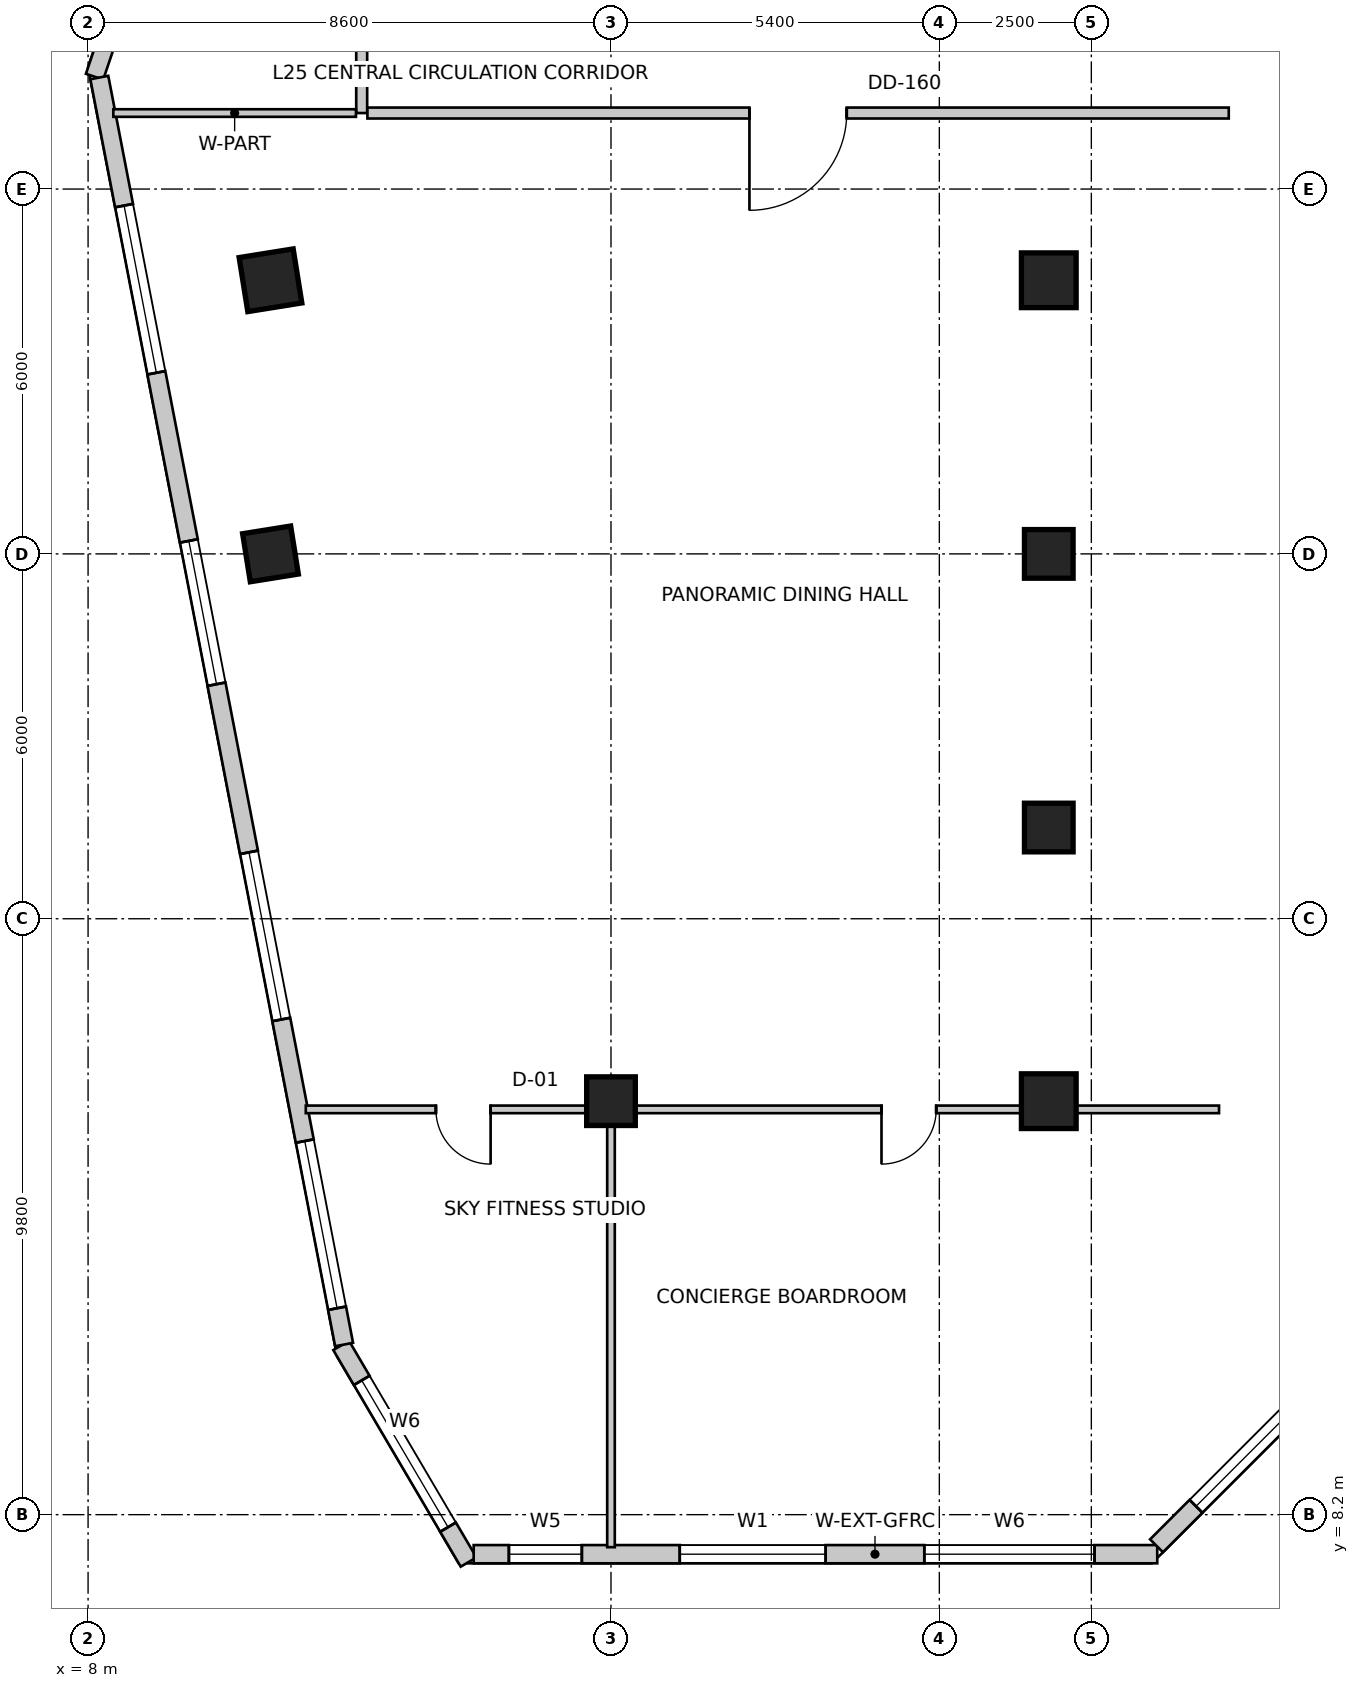
"""IFC4 building model, lengths in metres.
Left out: names, types, materials, properties, quantities, classifications, styles, units other than length and angle.
Written with IfcOpenShell. Run it as: python <this file> out.ifc"""

import sys

from ifc_helpers import new_model, si_unit, direction, frame, frame_2d, origin, origin_2d, place, context, subcontext, project, spatial, rectangle, extrude, source, transform, mapped, element, fill, save


model = new_model("IFC4")
c1 = context("Model", 3, precision=1e-05, world=origin(), true_north=direction((0.0, 1.0)))
c2 = subcontext(c1, "Body", "Model", "MODEL_VIEW")
j1 = project(units=[si_unit("LENGTHUNIT", "METRE"), si_unit("PLANEANGLEUNIT", "RADIAN")], contexts=[c1])
p1 = place(None, origin())
s1 = spatial("IfcSite", under=j1, at=p1, CompositionType="ELEMENT")
p2 = place(p1, origin())
s2 = spatial("IfcBuilding", under=s1, at=p2, CompositionType="ELEMENT")
p3 = place(p2, frame((0.0, 0.0, 105.4)))
s3 = spatial("IfcBuildingStorey", under=s2, at=p3, CompositionType="ELEMENT", Elevation=105.4)
m1 = source(origin(), c2, "Body", "SweptSolid", [
    extrude(rectangle(XDim=0.9, YDim=0.9, at=origin_2d()), origin(), (0.0, 0.0, 1.0), 5.2),
])
p4 = place(p3, frame((11.0, 28.5, 0.0), z_axis=(0.0, 0.0, 1.0), x_axis=(0.158158067254, -0.987413806751, 0.0)))
e1 = element("IfcColumn", 1, at=p4, inside=s3, PredefinedType="COLUMN", context=c2, shape_type="MappedRepresentation", body=[
    mapped(m1, transform((0.0, 0.0, 0.0), scale=1.0)),
])
m2 = source(origin(), c2, "Body", "SweptSolid", [
    extrude(rectangle(XDim=0.8, YDim=0.8, at=origin_2d()), origin(), (0.0, 0.0, 1.0), 5.2),
])
p5 = place(p3, frame((11.0, 24.0, 0.0), z_axis=(0.0, 0.0, 1.0), x_axis=(0.158158067254, -0.987413806751, 0.0)))
e2 = element("IfcColumn", 2, at=p5, inside=s3, PredefinedType="COLUMN", context=c2, shape_type="MappedRepresentation", body=[
    mapped(m2, transform((0.0, 0.0, 0.0), scale=1.0)),
])
p6 = place(p3, frame((23.8, 28.5, 0.0), z_axis=(0.0, 0.0, 1.0), x_axis=(1.0, 0.0, 0.0)))
e3 = element("IfcColumn", 3, at=p6, inside=s3, PredefinedType="COLUMN", context=c2, shape_type="MappedRepresentation", body=[
    mapped(m1, transform((0.0, 0.0, 0.0), scale=1.0)),
])
for number, where, z_axis, x_axis in (
    (4, (23.8, 24.0, 0.0), (0.0, 0.0, 1.0), (1.0, 0.0, 0.0)),
    (5, (23.8, 19.5, 0.0), (0.0, 0.0, 1.0), (1.0, 0.0, 0.0)),
):
    element("IfcColumn", number, at=place(p3, frame(where, z_axis=z_axis, x_axis=x_axis)), inside=s3, PredefinedType="COLUMN", context=c2, shape_type="MappedRepresentation", body=[
        mapped(m2, transform((0.0, 0.0, 0.0), scale=1.0)),
    ])
p7 = place(p3, frame((23.8, 15.0, 0.0), z_axis=(0.0, 0.0, 1.0), x_axis=(1.0, 0.0, 0.0)))
e6 = element("IfcColumn", 6, at=p7, inside=s3, PredefinedType="COLUMN", context=c2, shape_type="MappedRepresentation", body=[
    mapped(m1, transform((0.0, 0.0, 0.0), scale=1.0)),
])
p8 = place(p3, frame((16.6, 15.0, 0.0), z_axis=(0.0, 0.0, 1.0), x_axis=(1.0, 0.0, 0.0)))
e7 = element("IfcColumn", 7, at=p8, inside=s3, PredefinedType="COLUMN", context=c2, shape_type="MappedRepresentation", body=[
    mapped(m2, transform((0.0, 0.0, 0.0), scale=1.0)),
])
p9 = place(p3, frame((12.162, 10.983, 0.0), z_axis=(0.0, 0.0, 1.0), x_axis=(0.506996893234, -0.861947881401, 0.0)))
e8 = element("IfcWall", 8, at=p9, inside=s3, PredefinedType="SOLIDWALL", context=c2, shape_type="SweptSolid", body=[
    extrude(rectangle(XDim=4.133, YDim=0.3, at=frame_2d((2.066, 0.0))), origin(), (0.0, 0.0, 1.0), 4.95),
])
m3 = source(origin(), c2, "Body", "SweptSolid", [
    extrude(rectangle(XDim=2.8, YDim=2.4, at=frame_2d((1.4, 1.2))), frame((0.0, 0.16, 0.0), z_axis=(0.0, -1.0, 0.0), x_axis=(1.0, 0.0, 0.0)), (0.0, 0.0, 1.0), 0.32),
])
p10 = place(p9, frame((0.667, 0.0, 0.85)))
e9 = element("IfcOpeningElement", 9, at=p10, cuts=e8, PredefinedType="OPENING", context=c2, shape_type="MappedRepresentation", body=[
    mapped(m3, transform((0.0, 0.0, 0.0), scale=1.0)),
])
p11 = place(p3, frame((14.342, 7.55, 0.0), z_axis=(0.0, 0.0, 1.0), x_axis=(1.0, 0.0, 0.0)))
e10 = element("IfcWall", 10, at=p11, inside=s3, PredefinedType="SOLIDWALL", context=c2, shape_type="SweptSolid", body=[
    extrude(rectangle(XDim=11.242, YDim=0.3, at=frame_2d((5.621, 0.0))), origin(), (0.0, 0.0, 1.0), 4.95),
])
m4 = source(origin(), c2, "Body", "SweptSolid", [
    extrude(rectangle(XDim=1.2, YDim=1.6, at=frame_2d((0.6, 0.8))), frame((0.0, 0.16, 0.0), z_axis=(0.0, -1.0, 0.0), x_axis=(1.0, 0.0, 0.0)), (0.0, 0.0, 1.0), 0.32),
])
p12 = place(p11, frame((0.579, 0.0, 0.85)))
e11 = element("IfcOpeningElement", 11, at=p12, cuts=e10, PredefinedType="OPENING", context=c2, shape_type="MappedRepresentation", body=[
    mapped(m4, transform((0.0, 0.0, 0.0), scale=1.0)),
])
m5 = source(origin(), c2, "Body", "SweptSolid", [
    extrude(rectangle(XDim=2.4, YDim=2.2, at=frame_2d((1.2, 1.1))), frame((0.0, 0.16, 0.0), z_axis=(0.0, -1.0, 0.0), x_axis=(1.0, 0.0, 0.0)), (0.0, 0.0, 1.0), 0.32),
])
p13 = place(p11, frame((3.389, 0.0, 0.85)))
e12 = element("IfcOpeningElement", 12, at=p13, cuts=e10, PredefinedType="OPENING", context=c2, shape_type="MappedRepresentation", body=[
    mapped(m5, transform((0.0, 0.0, 0.0), scale=1.0)),
])
p14 = place(p11, frame((7.411, 0.0, 0.85)))
e13 = element("IfcOpeningElement", 13, at=p14, cuts=e10, PredefinedType="OPENING", context=c2, shape_type="MappedRepresentation", body=[
    mapped(m3, transform((0.0, 0.0, 0.0), scale=1.0)),
])
p15 = place(p3, frame((25.572, 7.688, 0.0), z_axis=(0.0, 0.0, 1.0), x_axis=(0.70708046583, 0.707133095564, 0.0)))
e14 = element("IfcWall", 14, at=p15, inside=s3, PredefinedType="SOLIDWALL", context=c2, shape_type="SweptSolid", body=[
    extrude(rectangle(XDim=4.639, YDim=0.3, at=frame_2d((2.319, 0.0))), origin(), (0.0, 0.0, 1.0), 4.95),
])
p16 = place(p15, frame((0.919, 0.0, 0.85)))
e15 = element("IfcOpeningElement", 15, at=p16, cuts=e14, PredefinedType="OPENING", context=c2, shape_type="MappedRepresentation", body=[
    mapped(m3, transform((0.0, 0.0, 0.0), scale=1.0)),
])
p17 = place(p3, frame((13.269, 47.134, 0.0), z_axis=(0.0, 0.0, 1.0), x_axis=(-0.319929596295, -0.947441319246, 0.0)))
e16 = element("IfcWall", 16, at=p17, inside=s3, PredefinedType="SOLIDWALL", context=c2, shape_type="SweptSolid", body=[
    extrude(rectangle(XDim=16.134, YDim=0.3, at=frame_2d((8.067, 0.0))), origin(), (0.0, 0.0, 1.0), 4.95),
])
p18 = place(p17, frame((2.276, 0.0, 0.85)))
e17 = element("IfcOpeningElement", 17, at=p18, cuts=e16, PredefinedType="OPENING", context=c2, shape_type="MappedRepresentation", body=[
    mapped(m5, transform((0.0, 0.0, 0.0), scale=1.0)),
])
p19 = place(p17, frame((7.011, 0.0, 0.85)))
e18 = element("IfcOpeningElement", 18, at=p19, cuts=e16, PredefinedType="OPENING", context=c2, shape_type="MappedRepresentation", body=[
    mapped(m3, transform((0.0, 0.0, 0.0), scale=1.0)),
])
p20 = place(p17, frame((12.147, 0.0, 0.85)))
e19 = element("IfcOpeningElement", 19, at=p20, cuts=e16, PredefinedType="OPENING", context=c2, shape_type="MappedRepresentation", body=[
    mapped(m5, transform((0.0, 0.0, 0.0), scale=1.0)),
])
p21 = place(p3, frame((8.185, 31.834, 0.0), z_axis=(0.0, 0.0, 1.0), x_axis=(0.189707113148, -0.981840725994, 0.0)))
e20 = element("IfcWall", 20, at=p21, inside=s3, PredefinedType="SOLIDWALL", context=c2, shape_type="SweptSolid", body=[
    extrude(rectangle(XDim=21.221, YDim=0.3, at=frame_2d((10.611, 0.0))), origin(), (0.0, 0.0, 1.0), 4.95),
])
p22 = place(p21, frame((2.145, 0.0, 0.85)))
e21 = element("IfcOpeningElement", 21, at=p22, cuts=e20, PredefinedType="OPENING", context=c2, shape_type="MappedRepresentation", body=[
    mapped(m3, transform((0.0, 0.0, 0.0), scale=1.0)),
])
p23 = place(p21, frame((7.761, 0.0, 0.85)))
e22 = element("IfcOpeningElement", 22, at=p23, cuts=e20, PredefinedType="OPENING", context=c2, shape_type="MappedRepresentation", body=[
    mapped(m5, transform((0.0, 0.0, 0.0), scale=1.0)),
])
p24 = place(p21, frame((12.977, 0.0, 0.85)))
e23 = element("IfcOpeningElement", 23, at=p24, cuts=e20, PredefinedType="OPENING", context=c2, shape_type="MappedRepresentation", body=[
    mapped(m3, transform((0.0, 0.0, 0.0), scale=1.0)),
])
p25 = place(p21, frame((17.813, 0.0, 0.85)))
e24 = element("IfcOpeningElement", 24, at=p25, cuts=e20, PredefinedType="OPENING", context=c2, shape_type="MappedRepresentation", body=[
    mapped(m3, transform((0.0, 0.0, 0.0), scale=1.0)),
])
p26 = place(p3, frame((12.5, 31.25, 0.0), z_axis=(0.0, 0.0, 1.0), x_axis=(0.0, 1.0, 0.0)))
e25 = element("IfcWall", 25, at=p26, inside=s3, PredefinedType="PARTITIONING", context=c2, shape_type="SweptSolid", body=[
    extrude(rectangle(XDim=2.2, YDim=0.18, at=frame_2d((1.1, 0.0))), origin(), (0.0, 0.0, 1.0), 4.619),
])
p27 = place(p3, frame((26.76, 31.25, 0.0), z_axis=(0.0, 0.0, 1.0), x_axis=(-1.0, 0.0, 0.0)))
e26 = element("IfcWall", 26, at=p27, inside=s3, PredefinedType="PARTITIONING", context=c2, shape_type="SweptSolid", body=[
    extrude(rectangle(XDim=14.166, YDim=0.18, at=frame_2d((7.083, 0.0))), origin(), (0.0, 0.0, 1.0), 4.619),
])
m6 = source(origin(), c2, "Body", "SweptSolid", [
    extrude(rectangle(XDim=1.6, YDim=2.15, at=frame_2d((0.8, 1.075))), frame((0.0, 0.1, 0.0), z_axis=(0.0, -1.0, 0.0), x_axis=(1.0, 0.0, 0.0)), (0.0, 0.0, 1.0), 0.2),
])
p28 = place(p27, frame((6.283, 0.0, 0.0)))
e27 = element("IfcOpeningElement", 27, at=p28, cuts=e26, PredefinedType="OPENING", context=c2, shape_type="MappedRepresentation", body=[
    mapped(m6, transform((0.0, 0.0, 0.0), scale=1.0)),
])
p29 = place(p3, frame((12.406, 31.25, 0.0), z_axis=(0.0, 0.0, 1.0), x_axis=(-1.0, 0.0, 0.0)))
e28 = element("IfcWall", 28, at=p29, inside=s3, PredefinedType="PARTITIONING", context=c2, shape_type="SweptSolid", body=[
    extrude(rectangle(XDim=3.991, YDim=0.125, at=frame_2d((1.996, 0.0))), origin(), (0.0, 0.0, 1.0), 4.092),
])
p30 = place(p3, frame((16.76, 14.865, 0.0), z_axis=(0.0, 0.0, 1.0), x_axis=(-1.0, 0.0, 0.0)))
e29 = element("IfcWall", 29, at=p30, inside=s3, PredefinedType="PARTITIONING", context=c2, shape_type="SweptSolid", body=[
    extrude(rectangle(XDim=5.179, YDim=0.125, at=frame_2d((2.59, 0.0))), origin(), (0.0, 0.0, 1.0), 4.092),
])
m7 = source(origin(), c2, "Body", "SweptSolid", [
    extrude(rectangle(XDim=0.9, YDim=2.15, at=frame_2d((0.45, 1.075))), frame((0.0, 0.073, 0.0), z_axis=(0.0, -1.0, 0.0), x_axis=(1.0, 0.0, 0.0)), (0.0, 0.0, 1.0), 0.145),
])
p31 = place(p30, frame((2.14, 0.0, 0.0)))
e30 = element("IfcOpeningElement", 30, at=p31, cuts=e29, PredefinedType="OPENING", context=c2, shape_type="MappedRepresentation", body=[
    mapped(m7, transform((0.0, 0.0, 0.0), scale=1.0)),
])
p32 = place(p3, frame((26.6, 14.865, 0.0), z_axis=(0.0, 0.0, 1.0), x_axis=(-1.0, 0.0, 0.0)))
e31 = element("IfcWall", 31, at=p32, inside=s3, PredefinedType="PARTITIONING", context=c2, shape_type="SweptSolid", body=[
    extrude(rectangle(XDim=9.838, YDim=0.125, at=frame_2d((4.919, 0.0))), origin(), (0.0, 0.0, 1.0), 4.092),
])
p33 = place(p32, frame((4.651, 0.0, 0.0)))
e32 = element("IfcOpeningElement", 32, at=p33, cuts=e31, PredefinedType="OPENING", context=c2, shape_type="MappedRepresentation", body=[
    mapped(m7, transform((0.0, 0.0, 0.0), scale=1.0)),
])
p34 = place(p3, frame((16.6, 14.799, 0.0), z_axis=(0.0, 0.0, 1.0), x_axis=(0.0, -1.0, 0.0)))
e33 = element("IfcWall", 33, at=p34, inside=s3, PredefinedType="PARTITIONING", context=c2, shape_type="SweptSolid", body=[
    extrude(rectangle(XDim=7.134, YDim=0.125, at=frame_2d((3.567, 0.0))), origin(), (0.0, 0.0, 1.0), 4.95),
])
m8 = source(origin(), c2, "Body", "SweptSolid", [
    extrude(rectangle(XDim=2.8, YDim=2.4, at=frame_2d((1.4, 1.2))), frame((0.0, -0.015, 0.0), z_axis=(0.0, -1.0, 0.0), x_axis=(1.0, 0.0, 0.0)), (0.0, 0.0, 1.0), 0.06),
])
p35 = place(p10, origin())
e34 = element("IfcWindow", 34, at=p35, inside=s3, PartitioningType="SINGLE_PANEL", PredefinedType="WINDOW", context=c2, shape_type="MappedRepresentation", body=[
    mapped(m8, transform((0.0, 0.0, 0.0), scale=1.0)),
])
fill(e9, e34)
m9 = source(origin(), c2, "Body", "SweptSolid", [
    extrude(rectangle(XDim=1.2, YDim=1.6, at=frame_2d((0.6, 0.8))), frame((0.0, -0.015, 0.0), z_axis=(0.0, -1.0, 0.0), x_axis=(1.0, 0.0, 0.0)), (0.0, 0.0, 1.0), 0.06),
])
p36 = place(p12, origin())
e35 = element("IfcWindow", 35, at=p36, inside=s3, PartitioningType="SINGLE_PANEL", PredefinedType="WINDOW", context=c2, shape_type="MappedRepresentation", body=[
    mapped(m9, transform((0.0, 0.0, 0.0), scale=1.0)),
])
fill(e11, e35)
m10 = source(origin(), c2, "Body", "SweptSolid", [
    extrude(rectangle(XDim=2.4, YDim=2.2, at=frame_2d((1.2, 1.1))), frame((0.0, -0.015, 0.0), z_axis=(0.0, -1.0, 0.0), x_axis=(1.0, 0.0, 0.0)), (0.0, 0.0, 1.0), 0.06),
])
p37 = place(p13, origin())
e36 = element("IfcWindow", 36, at=p37, inside=s3, PartitioningType="SINGLE_PANEL", PredefinedType="WINDOW", context=c2, shape_type="MappedRepresentation", body=[
    mapped(m10, transform((0.0, 0.0, 0.0), scale=1.0)),
])
fill(e12, e36)
p38 = place(p14, origin())
e37 = element("IfcWindow", 37, at=p38, inside=s3, PartitioningType="SINGLE_PANEL", PredefinedType="WINDOW", context=c2, shape_type="MappedRepresentation", body=[
    mapped(m8, transform((0.0, 0.0, 0.0), scale=1.0)),
])
fill(e13, e37)
p39 = place(p16, origin())
e38 = element("IfcWindow", 38, at=p39, inside=s3, PartitioningType="SINGLE_PANEL", PredefinedType="WINDOW", context=c2, shape_type="MappedRepresentation", body=[
    mapped(m8, transform((0.0, 0.0, 0.0), scale=1.0)),
])
fill(e15, e38)
p40 = place(p22, origin())
e39 = element("IfcWindow", 39, at=p40, inside=s3, PartitioningType="SINGLE_PANEL", PredefinedType="WINDOW", context=c2, shape_type="MappedRepresentation", body=[
    mapped(m8, transform((0.0, 0.0, 0.0), scale=1.0)),
])
fill(e21, e39)
p41 = place(p23, origin())
e40 = element("IfcWindow", 40, at=p41, inside=s3, PartitioningType="SINGLE_PANEL", PredefinedType="WINDOW", context=c2, shape_type="MappedRepresentation", body=[
    mapped(m10, transform((0.0, 0.0, 0.0), scale=1.0)),
])
fill(e22, e40)
p42 = place(p24, origin())
e41 = element("IfcWindow", 41, at=p42, inside=s3, PartitioningType="SINGLE_PANEL", PredefinedType="WINDOW", context=c2, shape_type="MappedRepresentation", body=[
    mapped(m8, transform((0.0, 0.0, 0.0), scale=1.0)),
])
fill(e23, e41)
p43 = place(p25, origin())
e42 = element("IfcWindow", 42, at=p43, inside=s3, PartitioningType="SINGLE_PANEL", PredefinedType="WINDOW", context=c2, shape_type="MappedRepresentation", body=[
    mapped(m8, transform((0.0, 0.0, 0.0), scale=1.0)),
])
fill(e24, e42)
m11 = source(origin(), c2, "Body", "SweptSolid", [
    extrude(rectangle(XDim=1.6, YDim=2.15, at=frame_2d((0.8, 1.075))), frame((0.0, 0.025, 0.0), z_axis=(0.0, -1.0, 0.0), x_axis=(1.0, 0.0, 0.0)), (0.0, 0.0, 1.0), 0.05),
])
p44 = place(p28, origin())
e43 = element("IfcDoor", 43, at=p44, inside=s3, OperationType="SINGLE_SWING_RIGHT", PredefinedType="DOOR", context=c2, shape_type="MappedRepresentation", body=[
    mapped(m11, transform((0.0, 0.0, 0.0), scale=1.0)),
])
fill(e27, e43)
m12 = source(origin(), c2, "Body", "SweptSolid", [
    extrude(rectangle(XDim=0.9, YDim=2.15, at=frame_2d((0.45, 1.075))), frame((0.0, 0.025, 0.0), z_axis=(0.0, -1.0, 0.0), x_axis=(1.0, 0.0, 0.0)), (0.0, 0.0, 1.0), 0.05),
])
p45 = place(p31, origin())
e44 = element("IfcDoor", 44, at=p45, inside=s3, OperationType="SINGLE_SWING_LEFT", PredefinedType="DOOR", context=c2, shape_type="MappedRepresentation", body=[
    mapped(m12, transform((0.0, 0.0, 0.0), scale=1.0)),
])
fill(e30, e44)
p46 = place(p33, origin())
e45 = element("IfcDoor", 45, at=p46, inside=s3, OperationType="SINGLE_SWING_RIGHT", PredefinedType="DOOR", context=c2, shape_type="MappedRepresentation", body=[
    mapped(m12, transform((0.0, 0.0, 0.0), scale=1.0)),
])
fill(e32, e45)
save(model, sys.argv[1])
